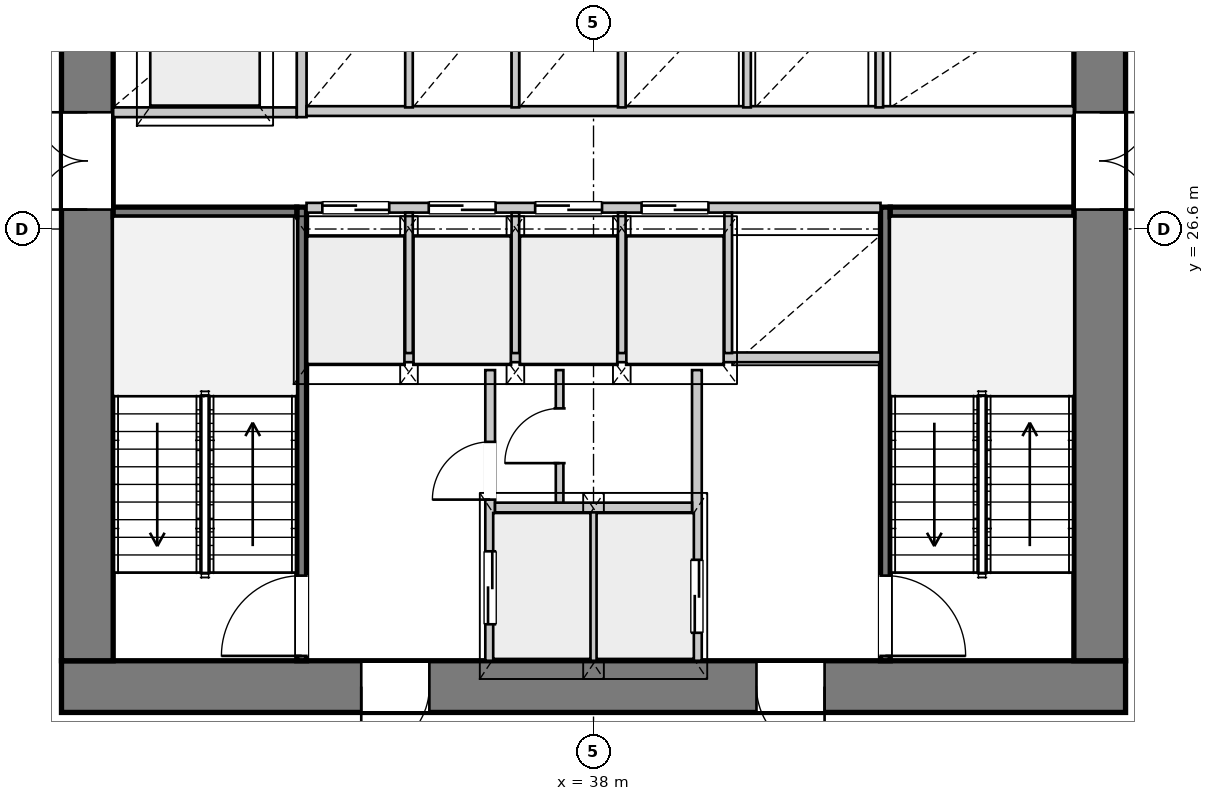
"""IFC4 building model, lengths in metres.
Left out: names, types, materials, properties, quantities, classifications, styles, units other than length and angle.
Written with IfcOpenShell. Run it as: python <this file> out.ifc"""

import sys

from ifc_helpers import new_model, si_unit, direction, frame, frame_2d, origin, place, context, subcontext, project, spatial, rectangle, extrude, source, transform, mapped, element, fill, save


model = new_model("IFC4")
c1 = context("Model", 3, precision=1e-05, world=origin(), true_north=direction((0.0, 1.0)))
c2 = subcontext(c1, "Body", "Model", "MODEL_VIEW")
j1 = project(units=[si_unit("LENGTHUNIT", "METRE"), si_unit("PLANEANGLEUNIT", "RADIAN")], contexts=[c1])
p1 = place(None, origin())
s1 = spatial("IfcSite", under=j1, at=p1, CompositionType="ELEMENT")
p2 = place(p1, origin())
s2 = spatial("IfcBuilding", under=s1, at=p2, CompositionType="ELEMENT")
p3 = place(p2, frame((0.0, 0.0, 39.95)))
s3 = spatial("IfcBuildingStorey", under=s2, at=p3, CompositionType="ELEMENT", Elevation=39.95)
p4 = place(p3, frame((46.75, 19.075, 0.0), z_axis=(0.0, 0.0, 1.0), x_axis=(-1.0, 0.0, 0.0)))
e1 = element("IfcWall", 1, at=p4, inside=s3, PredefinedType="SHEAR", context=c2, shape_type="SweptSolid", body=[
    extrude(rectangle(XDim=17.5, YDim=0.85, at=frame_2d((8.75, 0.0))), origin(), (0.0, 0.0, 1.0), 3.3),
])
p5 = place(p4, frame((4.95, 0.0, 0.0)))
e2 = element("IfcOpeningElement", 2, at=p5, cuts=e1, PredefinedType="OPENING", context=c2, shape_type="SweptSolid", body=[
    extrude(rectangle(XDim=1.12, YDim=2.25, at=frame_2d((0.56, 1.125))), frame((0.0, 0.435, 0.0), z_axis=(0.0, -1.0, 0.0), x_axis=(1.0, 0.0, 0.0)), (0.0, 0.0, 1.0), 0.87),
])
p6 = place(p4, frame((11.45, 0.0, 0.0)))
e3 = element("IfcOpeningElement", 3, at=p6, cuts=e1, PredefinedType="OPENING", context=c2, shape_type="SweptSolid", body=[
    extrude(rectangle(XDim=1.12, YDim=2.25, at=frame_2d((0.56, 1.125))), frame((0.0, 0.435, 0.0), z_axis=(0.0, -1.0, 0.0), x_axis=(1.0, 0.0, 0.0)), (0.0, 0.0, 1.0), 0.87),
])
p7 = place(p3, frame((29.675, 19.5, 0.0), z_axis=(0.0, 0.0, 1.0), x_axis=(0.0, 1.0, 0.0)))
e4 = element("IfcWall", 4, at=p7, inside=s3, PredefinedType="SHEAR", context=c2, shape_type="SweptSolid", body=[
    extrude(rectangle(XDim=14.2, YDim=0.85, at=frame_2d((7.1, 0.0))), origin(), (0.0, 0.0, 1.0), 3.3),
])
p8 = place(p7, frame((7.42, 0.0, 0.0)))
e5 = element("IfcOpeningElement", 5, at=p8, cuts=e4, PredefinedType="OPENING", context=c2, shape_type="SweptSolid", body=[
    extrude(rectangle(XDim=1.6, YDim=2.2, at=frame_2d((0.8, 1.1))), frame((0.0, 0.435, 0.0), z_axis=(0.0, -1.0, 0.0), x_axis=(1.0, 0.0, 0.0)), (0.0, 0.0, 1.0), 0.87),
])
p9 = place(p3, frame((46.325, 33.7, 0.0), z_axis=(0.0, 0.0, 1.0), x_axis=(0.0, -1.0, 0.0)))
e6 = element("IfcWall", 6, at=p9, inside=s3, PredefinedType="SHEAR", context=c2, shape_type="SweptSolid", body=[
    extrude(rectangle(XDim=14.2, YDim=0.85, at=frame_2d((7.1, 0.0))), origin(), (0.0, 0.0, 1.0), 3.3),
])
p10 = place(p9, frame((5.18, 0.0, 0.0)))
e7 = element("IfcOpeningElement", 7, at=p10, cuts=e6, PredefinedType="OPENING", context=c2, shape_type="SweptSolid", body=[
    extrude(rectangle(XDim=1.6, YDim=2.2, at=frame_2d((0.8, 1.1))), frame((0.0, 0.435, 0.0), z_axis=(0.0, -1.0, 0.0), x_axis=(1.0, 0.0, 0.0)), (0.0, 0.0, 1.0), 0.87),
])
p11 = place(p3, frame((33.2, 19.5, 0.0), z_axis=(0.0, 0.0, 1.0), x_axis=(0.0, 1.0, 0.0)))
e8 = element("IfcWall", 8, at=p11, inside=s3, PredefinedType="PARTITIONING", context=c2, shape_type="SweptSolid", body=[
    extrude(rectangle(XDim=7.46, YDim=0.16, at=frame_2d((3.73, 0.0))), origin(), (0.0, 0.0, 1.0), 3.3),
])
p12 = place(p11, frame((0.08, 0.0, 0.0)))
e9 = element("IfcOpeningElement", 9, at=p12, cuts=e8, PredefinedType="OPENING", context=c2, shape_type="SweptSolid", body=[
    extrude(rectangle(XDim=1.32, YDim=2.2, at=frame_2d((0.66, 1.1))), frame((0.0, 0.09, 0.0), z_axis=(0.0, -1.0, 0.0), x_axis=(1.0, 0.0, 0.0)), (0.0, 0.0, 1.0), 0.18),
])
p13 = place(p3, frame((30.1, 26.88, 0.0), z_axis=(0.0, 0.0, 1.0), x_axis=(1.0, 0.0, 0.0)))
e10 = element("IfcWall", 10, at=p13, inside=s3, PredefinedType="PARTITIONING", context=c2, shape_type="SweptSolid", body=[
    extrude(rectangle(XDim=3.02, YDim=0.16, at=frame_2d((1.51, 0.0))), origin(), (0.0, 0.0, 1.0), 3.3),
])
p14 = place(p3, frame((42.8, 26.96, 0.0), z_axis=(0.0, 0.0, 1.0), x_axis=(0.0, -1.0, 0.0)))
e11 = element("IfcWall", 11, at=p14, inside=s3, PredefinedType="PARTITIONING", context=c2, shape_type="SweptSolid", body=[
    extrude(rectangle(XDim=7.46, YDim=0.16, at=frame_2d((3.73, 0.0))), origin(), (0.0, 0.0, 1.0), 3.3),
])
p15 = place(p14, frame((6.06, 0.0, 0.0)))
e12 = element("IfcOpeningElement", 12, at=p15, cuts=e11, PredefinedType="OPENING", context=c2, shape_type="SweptSolid", body=[
    extrude(rectangle(XDim=1.32, YDim=2.2, at=frame_2d((0.66, 1.1))), frame((0.0, 0.09, 0.0), z_axis=(0.0, -1.0, 0.0), x_axis=(1.0, 0.0, 0.0)), (0.0, 0.0, 1.0), 0.18),
])
p16 = place(p3, frame((42.88, 26.88, 0.0), z_axis=(0.0, 0.0, 1.0), x_axis=(1.0, 0.0, 0.0)))
e13 = element("IfcWall", 13, at=p16, inside=s3, PredefinedType="PARTITIONING", context=c2, shape_type="SweptSolid", body=[
    extrude(rectangle(XDim=3.02, YDim=0.16, at=frame_2d((1.51, 0.0))), origin(), (0.0, 0.0, 1.0), 3.3),
])
p17 = place(p3, frame((36.3, 19.5, 0.0), z_axis=(0.0, 0.0, 1.0), x_axis=(0.0, 1.0, 0.0)))
e14 = element("IfcWall", 14, at=p17, inside=s3, PredefinedType="PARTITIONING", context=c2, shape_type="SweptSolid", body=[
    extrude(rectangle(XDim=4.78, YDim=0.16, at=frame_2d((2.39, 0.0))), origin(), (0.0, 0.0, 1.0), 3.3),
])
p18 = place(p17, frame((0.6, 0.0, 0.0)))
e15 = element("IfcOpeningElement", 15, at=p18, cuts=e14, PredefinedType="OPENING", context=c2, shape_type="SweptSolid", body=[
    extrude(rectangle(XDim=1.2, YDim=2.2, at=frame_2d((0.6, 1.1))), frame((0.0, 0.09, 0.0), z_axis=(0.0, -1.0, 0.0), x_axis=(1.0, 0.0, 0.0)), (0.0, 0.0, 1.0), 0.18),
])
p19 = place(p17, frame((2.65, 0.0, 0.0)))
e16 = element("IfcOpeningElement", 16, at=p19, cuts=e14, PredefinedType="OPENING", context=c2, shape_type="SweptSolid", body=[
    extrude(rectangle(XDim=0.95, YDim=2.1, at=frame_2d((0.475, 1.05))), frame((0.0, 0.09, 0.0), z_axis=(0.0, -1.0, 0.0), x_axis=(1.0, 0.0, 0.0)), (0.0, 0.0, 1.0), 0.18),
])
p20 = place(p3, frame((39.7, 24.28, 0.0), z_axis=(0.0, 0.0, 1.0), x_axis=(0.0, -1.0, 0.0)))
e17 = element("IfcWall", 17, at=p20, inside=s3, PredefinedType="PARTITIONING", context=c2, shape_type="SweptSolid", body=[
    extrude(rectangle(XDim=4.78, YDim=0.16, at=frame_2d((2.39, 0.0))), origin(), (0.0, 0.0, 1.0), 3.3),
])
p21 = place(p20, frame((3.12, 0.0, 0.0)))
e18 = element("IfcOpeningElement", 18, at=p21, cuts=e17, PredefinedType="OPENING", context=c2, shape_type="SweptSolid", body=[
    extrude(rectangle(XDim=1.2, YDim=2.2, at=frame_2d((0.6, 1.1))), frame((0.0, 0.09, 0.0), z_axis=(0.0, -1.0, 0.0), x_axis=(1.0, 0.0, 0.0)), (0.0, 0.0, 1.0), 0.18),
])
p22 = place(p3, frame((38.0, 19.5, 0.0), z_axis=(0.0, 0.0, 1.0), x_axis=(0.0, 1.0, 0.0)))
e19 = element("IfcWall", 19, at=p22, inside=s3, PredefinedType="PARTITIONING", context=c2, shape_type="SweptSolid", body=[
    extrude(rectangle(XDim=2.46, YDim=0.125, at=frame_2d((1.23, 0.0))), origin(), (0.0, 0.0, 1.0), 3.3),
])
p23 = place(p3, frame((36.38, 22.02, 0.0), z_axis=(0.0, 0.0, 1.0), x_axis=(1.0, 0.0, 0.0)))
e20 = element("IfcWall", 20, at=p23, inside=s3, PredefinedType="PARTITIONING", context=c2, shape_type="SweptSolid", body=[
    extrude(rectangle(XDim=3.24, YDim=0.16, at=frame_2d((1.62, 0.0))), origin(), (0.0, 0.0, 1.0), 3.3),
])
p24 = place(p3, frame((33.28, 24.49, 0.0), z_axis=(0.0, 0.0, 1.0), x_axis=(1.0, 0.0, 0.0)))
e21 = element("IfcWall", 21, at=p24, inside=s3, PredefinedType="PARTITIONING", context=c2, shape_type="SweptSolid", body=[
    extrude(rectangle(XDim=9.44, YDim=0.16, at=frame_2d((4.72, 0.0))), origin(), (0.0, 0.0, 1.0), 3.3),
])
p25 = place(p3, frame((37.442, 22.1, 0.0), z_axis=(0.0, 0.0, 1.0), x_axis=(0.0, 1.0, 0.0)))
e22 = element("IfcWall", 22, at=p25, inside=s3, PredefinedType="PARTITIONING", context=c2, shape_type="SweptSolid", body=[
    extrude(rectangle(XDim=2.18, YDim=0.125, at=frame_2d((1.09, 0.0))), origin(), (0.0, 0.0, 1.0), 3.3),
])
p26 = place(p25, frame((0.65, 0.0, 0.0)))
e23 = element("IfcOpeningElement", 23, at=p26, cuts=e22, PredefinedType="OPENING", context=c2, shape_type="SweptSolid", body=[
    extrude(rectangle(XDim=0.9, YDim=2.1, at=frame_2d((0.45, 1.05))), frame((0.0, 0.073, 0.0), z_axis=(0.0, -1.0, 0.0), x_axis=(1.0, 0.0, 0.0)), (0.0, 0.0, 1.0), 0.145),
])
p27 = place(p3, frame((30.1, 28.52, 0.0), z_axis=(0.0, 0.0, 1.0), x_axis=(1.0, 0.0, 0.0)))
e24 = element("IfcWall", 24, at=p27, inside=s3, PredefinedType="PARTITIONING", context=c2, shape_type="SweptSolid", body=[
    extrude(rectangle(XDim=3.02, YDim=0.16, at=frame_2d((1.51, 0.0))), origin(), (0.0, 0.0, 1.0), 3.3),
])
p28 = place(p3, frame((33.2, 28.44, 0.0), z_axis=(0.0, 0.0, 1.0), x_axis=(0.0, 1.0, 0.0)))
e25 = element("IfcWall", 25, at=p28, inside=s3, PredefinedType="PARTITIONING", context=c2, shape_type="SweptSolid", body=[
    extrude(rectangle(XDim=5.26, YDim=0.16, at=frame_2d((2.63, 0.0))), origin(), (0.0, 0.0, 1.0), 3.3),
])
p29 = place(p3, frame((33.28, 26.95, 0.0), z_axis=(0.0, 0.0, 1.0), x_axis=(1.0, 0.0, 0.0)))
e26 = element("IfcWall", 26, at=p29, inside=s3, PredefinedType="PARTITIONING", context=c2, shape_type="SweptSolid", body=[
    extrude(rectangle(XDim=9.44, YDim=0.16, at=frame_2d((4.72, 0.0))), origin(), (0.0, 0.0, 1.0), 3.3),
])
p30 = place(p29, frame((0.26, 0.0, 0.0)))
e27 = element("IfcOpeningElement", 27, at=p30, cuts=e26, PredefinedType="OPENING", context=c2, shape_type="SweptSolid", body=[
    extrude(rectangle(XDim=1.1, YDim=2.2, at=frame_2d((0.55, 1.1))), frame((0.0, 0.09, 0.0), z_axis=(0.0, -1.0, 0.0), x_axis=(1.0, 0.0, 0.0)), (0.0, 0.0, 1.0), 0.18),
])
p31 = place(p29, frame((2.01, 0.0, 0.0)))
e28 = element("IfcOpeningElement", 28, at=p31, cuts=e26, PredefinedType="OPENING", context=c2, shape_type="SweptSolid", body=[
    extrude(rectangle(XDim=1.1, YDim=2.2, at=frame_2d((0.55, 1.1))), frame((0.0, 0.09, 0.0), z_axis=(0.0, -1.0, 0.0), x_axis=(1.0, 0.0, 0.0)), (0.0, 0.0, 1.0), 0.18),
])
p32 = place(p29, frame((3.76, 0.0, 0.0)))
e29 = element("IfcOpeningElement", 29, at=p32, cuts=e26, PredefinedType="OPENING", context=c2, shape_type="SweptSolid", body=[
    extrude(rectangle(XDim=1.1, YDim=2.2, at=frame_2d((0.55, 1.1))), frame((0.0, 0.09, 0.0), z_axis=(0.0, -1.0, 0.0), x_axis=(1.0, 0.0, 0.0)), (0.0, 0.0, 1.0), 0.18),
])
p33 = place(p29, frame((5.51, 0.0, 0.0)))
e30 = element("IfcOpeningElement", 30, at=p33, cuts=e26, PredefinedType="OPENING", context=c2, shape_type="SweptSolid", body=[
    extrude(rectangle(XDim=1.1, YDim=2.2, at=frame_2d((0.55, 1.1))), frame((0.0, 0.09, 0.0), z_axis=(0.0, -1.0, 0.0), x_axis=(1.0, 0.0, 0.0)), (0.0, 0.0, 1.0), 0.18),
])
for number, where, z_axis, x_axis in (
    (31, (34.965, 24.56, 0.0), (0.0, 0.0, 1.0), (0.0, 1.0, 0.0)),
    (32, (36.715, 24.56, 0.0), (0.0, 0.0, 1.0), (0.0, 1.0, 0.0)),
    (33, (38.465, 24.56, 0.0), (0.0, 0.0, 1.0), (0.0, 1.0, 0.0)),
    (34, (40.215, 24.56, 0.0), (0.0, 0.0, 1.0), (0.0, 1.0, 0.0)),
):
    element("IfcWall", number, at=place(p3, frame(where, z_axis=z_axis, x_axis=x_axis)), inside=s3, PredefinedType="PARTITIONING", context=c2, shape_type="SweptSolid", body=[
        extrude(rectangle(XDim=2.31, YDim=0.125, at=frame_2d((1.155, 0.0))), origin(), (0.0, 0.0, 1.0), 3.3),
    ])
p34 = place(p3, frame((33.28, 28.54, 0.0), z_axis=(0.0, 0.0, 1.0), x_axis=(1.0, 0.0, 0.0)))
e35 = element("IfcWall", 35, at=p34, inside=s3, PredefinedType="PARTITIONING", context=c2, shape_type="SweptSolid", body=[
    extrude(rectangle(XDim=12.62, YDim=0.16, at=frame_2d((6.31, 0.0))), origin(), (0.0, 0.0, 1.0), 3.3),
])
for number, where, z_axis, x_axis in (
    (36, (34.965, 28.6, 0.0), (0.0, 0.0, 1.0), (0.0, 1.0, 0.0)),
    (37, (36.715, 28.6, 0.0), (0.0, 0.0, 1.0), (0.0, 1.0, 0.0)),
    (38, (38.465, 28.6, 0.0), (0.0, 0.0, 1.0), (0.0, 1.0, 0.0)),
    (39, (40.525, 28.6, 0.0), (0.0, 0.0, 1.0), (0.0, 1.0, 0.0)),
    (40, (42.7, 28.6, 0.0), (0.0, 0.0, 1.0), (0.0, 1.0, 0.0)),
):
    element("IfcWall", number, at=place(p3, frame(where, z_axis=z_axis, x_axis=x_axis)), inside=s3, PredefinedType="PARTITIONING", context=c2, shape_type="SweptSolid", body=[
        extrude(rectangle(XDim=1.92, YDim=0.125, at=frame_2d((0.96, 0.0))), origin(), (0.0, 0.0, 1.0), 3.3),
    ])
m1 = source(origin(), c2, "Body", "SweptSolid", [
    extrude(rectangle(XDim=1.12, YDim=2.25, at=frame_2d((0.56, 1.125))), frame((0.0, 0.025, 0.0), z_axis=(0.0, -1.0, 0.0), x_axis=(1.0, 0.0, 0.0)), (0.0, 0.0, 1.0), 0.05),
])
p35 = place(p5, origin())
e41 = element("IfcDoor", 41, at=p35, inside=s3, OperationType="SINGLE_SWING_LEFT", PredefinedType="DOOR", context=c2, shape_type="MappedRepresentation", body=[
    mapped(m1, transform((0.0, 0.0, 0.0), x_axis=(1.0, 0.0, 0.0), y_axis=(0.0, 1.0, 0.0), z_axis=(0.0, 0.0, 1.0), scale=1.0)),
])
fill(e2, e41)
p36 = place(p6, origin())
e42 = element("IfcDoor", 42, at=p36, inside=s3, OperationType="SINGLE_SWING_RIGHT", PredefinedType="DOOR", context=c2, shape_type="MappedRepresentation", body=[
    mapped(m1, transform((0.0, 0.0, 0.0), x_axis=(1.0, 0.0, 0.0), y_axis=(0.0, 1.0, 0.0), z_axis=(0.0, 0.0, 1.0), scale=1.0)),
])
fill(e3, e42)
m2 = source(origin(), c2, "Body", "SweptSolid", [
    extrude(rectangle(XDim=1.6, YDim=2.2, at=frame_2d((0.8, 1.1))), frame((0.0, 0.025, 0.0), z_axis=(0.0, -1.0, 0.0), x_axis=(1.0, 0.0, 0.0)), (0.0, 0.0, 1.0), 0.05),
])
p37 = place(p8, origin())
e43 = element("IfcDoor", 43, at=p37, inside=s3, OperationType="DOUBLE_DOOR_SINGLE_SWING", PredefinedType="DOOR", context=c2, shape_type="MappedRepresentation", body=[
    mapped(m2, transform((0.0, 0.0, 0.0), x_axis=(1.0, 0.0, 0.0), y_axis=(0.0, 1.0, 0.0), z_axis=(0.0, 0.0, 1.0), scale=1.0)),
])
fill(e5, e43)
p38 = place(p10, origin())
e44 = element("IfcDoor", 44, at=p38, inside=s3, OperationType="DOUBLE_DOOR_SINGLE_SWING", PredefinedType="DOOR", context=c2, shape_type="MappedRepresentation", body=[
    mapped(m2, transform((0.0, 0.0, 0.0), x_axis=(1.0, 0.0, 0.0), y_axis=(0.0, 1.0, 0.0), z_axis=(0.0, 0.0, 1.0), scale=1.0)),
])
fill(e7, e44)
m3 = source(origin(), c2, "Body", "SweptSolid", [
    extrude(rectangle(XDim=1.32, YDim=2.2, at=frame_2d((0.66, 1.1))), frame((0.0, 0.025, 0.0), z_axis=(0.0, -1.0, 0.0), x_axis=(1.0, 0.0, 0.0)), (0.0, 0.0, 1.0), 0.05),
])
p39 = place(p12, origin())
e45 = element("IfcDoor", 45, at=p39, inside=s3, OperationType="SINGLE_SWING_LEFT", PredefinedType="DOOR", context=c2, shape_type="MappedRepresentation", body=[
    mapped(m3, transform((0.0, 0.0, 0.0), x_axis=(1.0, 0.0, 0.0), y_axis=(0.0, 1.0, 0.0), z_axis=(0.0, 0.0, 1.0), scale=1.0)),
])
fill(e9, e45)
p40 = place(p15, origin())
e46 = element("IfcDoor", 46, at=p40, inside=s3, OperationType="SINGLE_SWING_RIGHT", PredefinedType="DOOR", context=c2, shape_type="MappedRepresentation", body=[
    mapped(m3, transform((0.0, 0.0, 0.0), x_axis=(1.0, 0.0, 0.0), y_axis=(0.0, 1.0, 0.0), z_axis=(0.0, 0.0, 1.0), scale=1.0)),
])
fill(e12, e46)
m4 = source(origin(), c2, "Body", "SweptSolid", [
    extrude(rectangle(XDim=1.2, YDim=2.2, at=frame_2d((0.6, 1.1))), frame((0.0, 0.025, 0.0), z_axis=(0.0, -1.0, 0.0), x_axis=(1.0, 0.0, 0.0)), (0.0, 0.0, 1.0), 0.05),
])
p41 = place(p18, origin())
e47 = element("IfcDoor", 47, at=p41, inside=s3, OperationType="DOUBLE_DOOR_SLIDING", PredefinedType="DOOR", context=c2, shape_type="MappedRepresentation", body=[
    mapped(m4, transform((0.0, 0.0, 0.0), x_axis=(1.0, 0.0, 0.0), y_axis=(0.0, 1.0, 0.0), z_axis=(0.0, 0.0, 1.0), scale=1.0)),
])
fill(e15, e47)
m5 = source(origin(), c2, "Body", "SweptSolid", [
    extrude(rectangle(XDim=0.95, YDim=2.1, at=frame_2d((0.475, 1.05))), frame((0.0, 0.025, 0.0), z_axis=(0.0, -1.0, 0.0), x_axis=(1.0, 0.0, 0.0)), (0.0, 0.0, 1.0), 0.05),
])
p42 = place(p19, origin())
e48 = element("IfcDoor", 48, at=p42, inside=s3, OperationType="SINGLE_SWING_LEFT", PredefinedType="DOOR", context=c2, shape_type="MappedRepresentation", body=[
    mapped(m5, transform((0.0, 0.0, 0.0), x_axis=(1.0, 0.0, 0.0), y_axis=(0.0, 1.0, 0.0), z_axis=(0.0, 0.0, 1.0), scale=1.0)),
])
fill(e16, e48)
m6 = source(origin(), c2, "Body", "SweptSolid", [
    extrude(rectangle(XDim=0.9, YDim=2.1, at=frame_2d((0.45, 1.05))), frame((0.0, 0.025, 0.0), z_axis=(0.0, -1.0, 0.0), x_axis=(1.0, 0.0, 0.0)), (0.0, 0.0, 1.0), 0.05),
])
p43 = place(p26, origin())
e49 = element("IfcDoor", 49, at=p43, inside=s3, OperationType="SINGLE_SWING_LEFT", PredefinedType="DOOR", context=c2, shape_type="MappedRepresentation", body=[
    mapped(m6, transform((0.0, 0.0, 0.0), x_axis=(1.0, 0.0, 0.0), y_axis=(0.0, 1.0, 0.0), z_axis=(0.0, 0.0, 1.0), scale=1.0)),
])
fill(e23, e49)
p44 = place(p21, origin())
e50 = element("IfcDoor", 50, at=p44, inside=s3, OperationType="DOUBLE_DOOR_SLIDING", PredefinedType="DOOR", context=c2, shape_type="MappedRepresentation", body=[
    mapped(m4, transform((0.0, 0.0, 0.0), x_axis=(1.0, 0.0, 0.0), y_axis=(0.0, 1.0, 0.0), z_axis=(0.0, 0.0, 1.0), scale=1.0)),
])
fill(e18, e50)
m7 = source(origin(), c2, "Body", "SweptSolid", [
    extrude(rectangle(XDim=1.1, YDim=2.2, at=frame_2d((0.55, 1.1))), frame((0.0, 0.025, 0.0), z_axis=(0.0, -1.0, 0.0), x_axis=(1.0, 0.0, 0.0)), (0.0, 0.0, 1.0), 0.05),
])
p45 = place(p30, origin())
e51 = element("IfcDoor", 51, at=p45, inside=s3, OperationType="DOUBLE_DOOR_SLIDING", PredefinedType="DOOR", context=c2, shape_type="MappedRepresentation", body=[
    mapped(m7, transform((0.0, 0.0, 0.0), x_axis=(1.0, 0.0, 0.0), y_axis=(0.0, 1.0, 0.0), z_axis=(0.0, 0.0, 1.0), scale=1.0)),
])
fill(e27, e51)
p46 = place(p31, origin())
e52 = element("IfcDoor", 52, at=p46, inside=s3, OperationType="DOUBLE_DOOR_SLIDING", PredefinedType="DOOR", context=c2, shape_type="MappedRepresentation", body=[
    mapped(m7, transform((0.0, 0.0, 0.0), x_axis=(1.0, 0.0, 0.0), y_axis=(0.0, 1.0, 0.0), z_axis=(0.0, 0.0, 1.0), scale=1.0)),
])
fill(e28, e52)
p47 = place(p32, origin())
e53 = element("IfcDoor", 53, at=p47, inside=s3, OperationType="DOUBLE_DOOR_SLIDING", PredefinedType="DOOR", context=c2, shape_type="MappedRepresentation", body=[
    mapped(m7, transform((0.0, 0.0, 0.0), x_axis=(1.0, 0.0, 0.0), y_axis=(0.0, 1.0, 0.0), z_axis=(0.0, 0.0, 1.0), scale=1.0)),
])
fill(e29, e53)
p48 = place(p33, origin())
e54 = element("IfcDoor", 54, at=p48, inside=s3, OperationType="DOUBLE_DOOR_SLIDING", PredefinedType="DOOR", context=c2, shape_type="MappedRepresentation", body=[
    mapped(m7, transform((0.0, 0.0, 0.0), x_axis=(1.0, 0.0, 0.0), y_axis=(0.0, 1.0, 0.0), z_axis=(0.0, 0.0, 1.0), scale=1.0)),
])
fill(e30, e54)
save(model, sys.argv[1])
